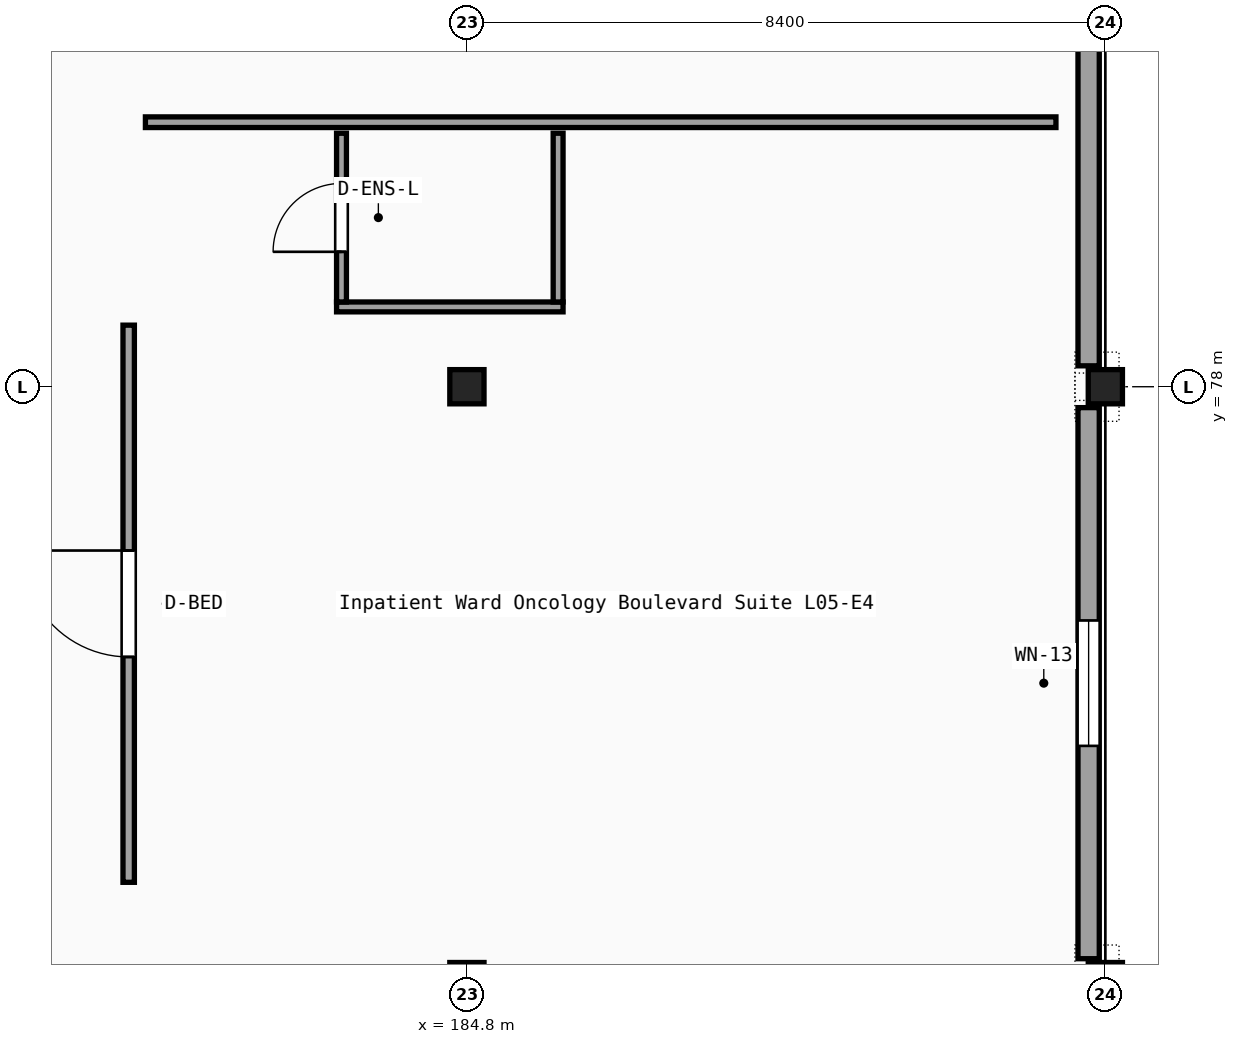
"""IFC4 building model, lengths in metres.
Left out: names, types, materials, properties, quantities, classifications, styles, units other than length and angle.
Written with IfcOpenShell. Run it as: python <this file> out.ifc"""

import sys

from ifc_helpers import new_model, si_unit, direction, frame, frame_2d, origin, origin_2d, place, context, subcontext, project, spatial, rectangle, i_section, extrude, element, fill, save


model = new_model("IFC4")
c1 = context("Model", 3, precision=1e-05, world=origin(), true_north=direction((0.0, 1.0)))
c2 = subcontext(c1, "Body", "Model", "MODEL_VIEW")
j1 = project(units=[si_unit("LENGTHUNIT", "METRE"), si_unit("PLANEANGLEUNIT", "RADIAN")], contexts=[c1])
p1 = place(None, origin())
s1 = spatial("IfcSite", under=j1, at=p1, CompositionType="ELEMENT")
p2 = place(p1, origin())
s2 = spatial("IfcBuilding", under=s1, at=p2, CompositionType="ELEMENT")
p3 = place(p2, frame((0.0, 0.0, 22.95)))
s3 = spatial("IfcBuildingStorey", under=s2, at=p3, CompositionType="ELEMENT", Elevation=22.95)
for number, where, z_axis, x_axis in (
    (1, (184.8, 70.2, 0.0), (0.0, 0.0, 1.0), (1.0, 0.0, 0.0)),
    (2, (184.8, 78.0, 0.0), (0.0, 0.0, 1.0), (1.0, 0.0, 0.0)),
    (3, (193.2, 70.2, 0.0), (0.0, 0.0, 1.0), (1.0, 0.0, 0.0)),
    (4, (193.2, 78.0, 0.0), (0.0, 0.0, 1.0), (1.0, 0.0, 0.0)),
):
    element("IfcColumn", number, at=place(p3, frame(where, z_axis=z_axis, x_axis=x_axis)), inside=s3, PredefinedType="COLUMN", context=c2, shape_type="SweptSolid", body=[
        extrude(i_section(OverallWidth=0.3, OverallDepth=0.45, WebThickness=0.014, FlangeThickness=0.026, FilletRadius=0.027, at=origin_2d()), origin(), (0.0, 0.0, 1.0), 4.05),
    ])
p4 = place(p3, frame((192.98, 70.475, 0.0), z_axis=(0.0, 0.0, 1.0), x_axis=(0.0, 1.0, 0.0)))
e5 = element("IfcWall", 5, at=p4, inside=s3, PredefinedType="SOLIDWALL", context=c2, shape_type="SweptSolid", body=[
    extrude(rectangle(XDim=7.25, YDim=0.28, at=frame_2d((3.625, 0.0))), origin(), (0.0, 0.0, 1.0), 3.25),
])
p5 = place(p4, frame((2.8, 0.0, 0.75)))
e6 = element("IfcOpeningElement", 6, at=p5, cuts=e5, PredefinedType="OPENING", context=c2, shape_type="SweptSolid", body=[
    extrude(rectangle(XDim=1.65, YDim=1.75, at=frame_2d((0.825, 0.875))), frame((0.0, 0.15, 0.0), z_axis=(0.0, -1.0, 0.0), x_axis=(1.0, 0.0, 0.0)), (0.0, 0.0, 1.0), 0.3),
])
p6 = place(p3, frame((192.98, 78.275, 0.0), z_axis=(0.0, 0.0, 1.0), x_axis=(0.0, 1.0, 0.0)))
e7 = element("IfcWall", 7, at=p6, inside=s3, PredefinedType="SOLIDWALL", context=c2, shape_type="SweptSolid", body=[
    extrude(rectangle(XDim=7.25, YDim=0.28, at=frame_2d((3.625, 0.0))), origin(), (0.0, 0.0, 1.0), 3.25),
])
p7 = place(p3, frame((180.35, 71.48, 0.0), z_axis=(0.0, 0.0, 1.0), x_axis=(0.0, 1.0, 0.0)))
e8 = element("IfcWall", 8, at=p7, inside=s3, PredefinedType="PARTITIONING", context=c2, shape_type="SweptSolid", body=[
    extrude(rectangle(XDim=7.33, YDim=0.15, at=frame_2d((3.665, 0.0))), origin(), (0.0, 0.0, 1.0), 3.25),
])
p8 = place(p7, frame((2.965, 0.0, 0.0)))
e9 = element("IfcOpeningElement", 9, at=p8, cuts=e8, PredefinedType="OPENING", context=c2, shape_type="SweptSolid", body=[
    extrude(rectangle(XDim=1.4, YDim=2.2, at=frame_2d((0.7, 1.1))), frame((0.0, 0.085, 0.0), z_axis=(0.0, -1.0, 0.0), x_axis=(1.0, 0.0, 0.0)), (0.0, 0.0, 1.0), 0.17),
])
p9 = place(p3, frame((180.57, 81.48, 0.0), z_axis=(0.0, 0.0, 1.0), x_axis=(1.0, 0.0, 0.0)))
e10 = element("IfcWall", 10, at=p9, inside=s3, PredefinedType="PARTITIONING", context=c2, shape_type="SweptSolid", body=[
    extrude(rectangle(XDim=11.98, YDim=0.14, at=frame_2d((5.99, 0.0))), origin(), (0.0, 0.0, 1.0), 3.51),
])
p10 = place(p3, frame((183.085, 79.05, 0.0), z_axis=(0.0, 0.0, 1.0), x_axis=(1.0, 0.0, 0.0)))
e11 = element("IfcWall", 11, at=p10, inside=s3, PredefinedType="PARTITIONING", context=c2, shape_type="SweptSolid", body=[
    extrude(rectangle(XDim=2.98, YDim=0.13, at=frame_2d((1.49, 0.0))), origin(), (0.0, 0.0, 1.0), 3.51),
])
p11 = place(p3, frame((183.15, 79.115, 0.0), z_axis=(0.0, 0.0, 1.0), x_axis=(0.0, 1.0, 0.0)))
e12 = element("IfcWall", 12, at=p11, inside=s3, PredefinedType="PARTITIONING", context=c2, shape_type="SweptSolid", body=[
    extrude(rectangle(XDim=2.22, YDim=0.13, at=frame_2d((1.11, 0.0))), origin(), (0.0, 0.0, 1.0), 3.77),
])
p12 = place(p11, frame((0.66, 0.0, 0.0)))
e13 = element("IfcOpeningElement", 13, at=p12, cuts=e12, PredefinedType="OPENING", context=c2, shape_type="SweptSolid", body=[
    extrude(rectangle(XDim=0.9, YDim=2.1, at=frame_2d((0.45, 1.05))), frame((0.0, 0.075, 0.0), z_axis=(0.0, -1.0, 0.0), x_axis=(1.0, 0.0, 0.0)), (0.0, 0.0, 1.0), 0.15),
])
p13 = place(p3, frame((186.0, 79.115, 0.0), z_axis=(0.0, 0.0, 1.0), x_axis=(0.0, 1.0, 0.0)))
e14 = element("IfcWall", 14, at=p13, inside=s3, PredefinedType="PARTITIONING", context=c2, shape_type="SweptSolid", body=[
    extrude(rectangle(XDim=2.22, YDim=0.13, at=frame_2d((1.11, 0.0))), origin(), (0.0, 0.0, 1.0), 3.77),
])
p14 = place(p5, origin())
e15 = element("IfcWindow", 15, at=p14, inside=s3, PartitioningType="SINGLE_PANEL", PredefinedType="WINDOW", context=c2, shape_type="SweptSolid", body=[
    extrude(rectangle(XDim=1.65, YDim=1.75, at=frame_2d((0.825, 0.875))), frame((0.0, 0.03, 0.0), z_axis=(0.0, -1.0, 0.0), x_axis=(1.0, 0.0, 0.0)), (0.0, 0.0, 1.0), 0.06),
])
fill(e6, e15)
p15 = place(p8, origin())
e16 = element("IfcDoor", 16, at=p15, inside=s3, OperationType="SINGLE_SWING_RIGHT", PredefinedType="DOOR", context=c2, shape_type="SweptSolid", body=[
    extrude(rectangle(XDim=1.4, YDim=2.2, at=frame_2d((0.7, 1.1))), frame((0.0, 0.025, 0.0), z_axis=(0.0, -1.0, 0.0), x_axis=(1.0, 0.0, 0.0)), (0.0, 0.0, 1.0), 0.05),
])
fill(e9, e16)
p16 = place(p12, origin())
e17 = element("IfcDoor", 17, at=p16, inside=s3, OperationType="SINGLE_SWING_LEFT", PredefinedType="DOOR", context=c2, shape_type="SweptSolid", body=[
    extrude(rectangle(XDim=0.9, YDim=2.1, at=frame_2d((0.45, 1.05))), frame((0.0, 0.025, 0.0), z_axis=(0.0, -1.0, 0.0), x_axis=(1.0, 0.0, 0.0)), (0.0, 0.0, 1.0), 0.05),
])
fill(e13, e17)
save(model, sys.argv[1])
